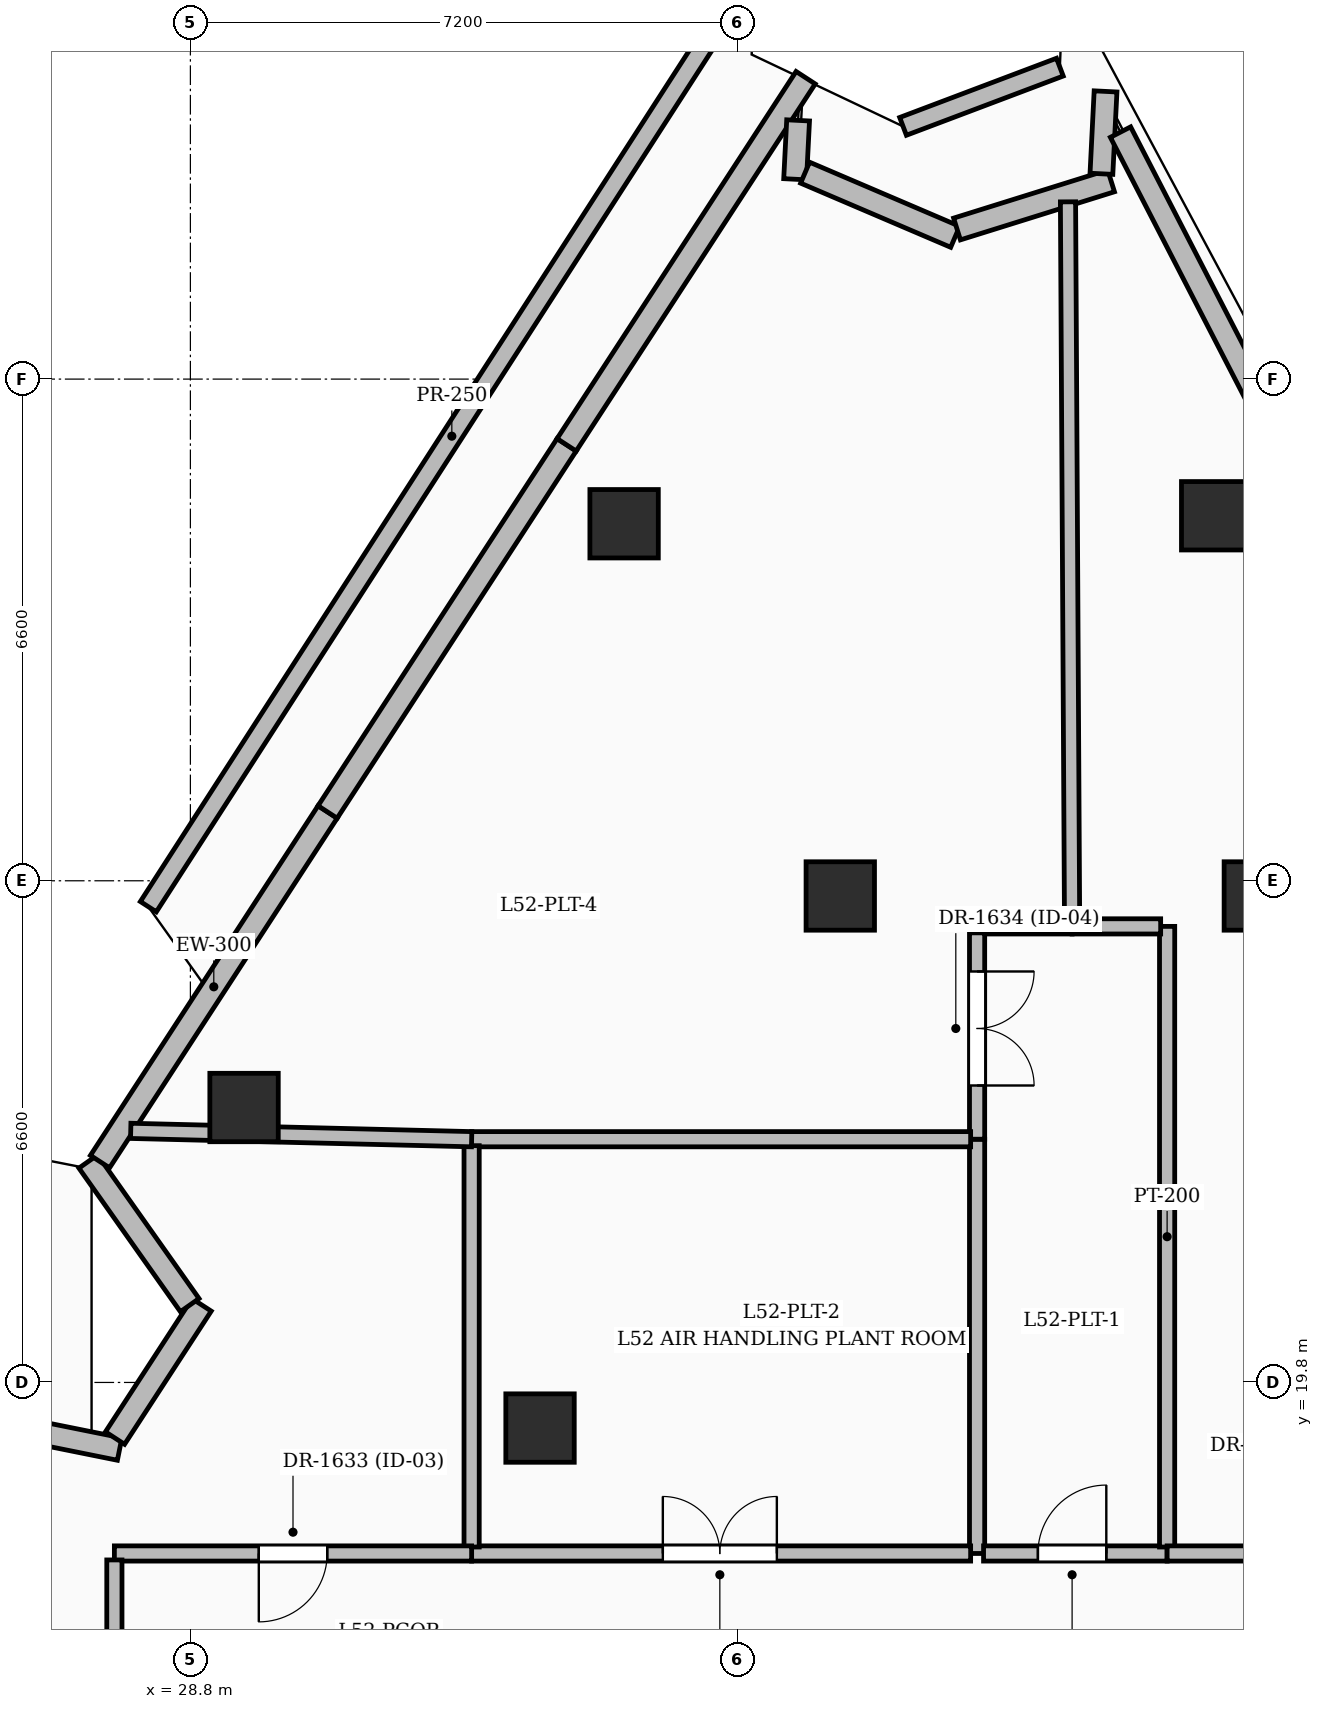
"""IFC4 building model, lengths in metres.
Left out: names, types, materials, properties, quantities, classifications, styles, units other than length and angle.
Written with IfcOpenShell. Run it as: python <this file> out.ifc"""

import sys

from ifc_helpers import new_model, si_unit, direction, frame, frame_2d, origin, origin_2d, place, context, subcontext, project, spatial, rectangle, extrude, element, fill, save


model = new_model("IFC4")
c1 = context("Model", 3, precision=1e-05, world=origin(), true_north=direction((0.0, 1.0)))
c2 = subcontext(c1, "Body", "Model", "MODEL_VIEW")
j1 = project(units=[si_unit("LENGTHUNIT", "METRE"), si_unit("PLANEANGLEUNIT", "RADIAN")], contexts=[c1])
p1 = place(None, origin())
s1 = spatial("IfcSite", under=j1, at=p1, CompositionType="ELEMENT")
p2 = place(p1, origin())
s2 = spatial("IfcBuilding", under=s1, at=p2, CompositionType="ELEMENT")
p3 = place(p2, frame((0.0, 0.0, 201.6)))
s3 = spatial("IfcBuildingStorey", under=s2, at=p3, CompositionType="ELEMENT", Elevation=201.6)
for number, where, z_axis, x_axis in (
    (1, (42.85, 26.2, 0.0), (0.0, 0.0, 1.0), (1.0, 0.0, 0.0)),
    (2, (37.35, 26.2, 0.0), (0.0, 0.0, 1.0), (1.0, 0.0, 0.0)),
    (3, (33.4, 19.2, 0.0), (0.0, 0.0, 1.0), (1.0, 0.0, 0.0)),
    (4, (42.289, 31.202, 0.0), (0.0, 0.0, 1.0), (1.0, 0.0, 0.0)),
    (5, (34.506, 31.097, 0.0), (0.0, 0.0, 1.0), (1.0, 0.0, 0.0)),
    (6, (29.506, 23.417, 0.0), (0.0, 0.0, 1.0), (1.0, 0.0, 0.0)),
):
    element("IfcColumn", number, at=place(p3, frame(where, z_axis=z_axis, x_axis=x_axis)), inside=s3, PredefinedType="COLUMN", context=c2, shape_type="SweptSolid", body=[
        extrude(rectangle(XDim=0.9, YDim=0.9, at=origin_2d()), origin(), (0.0, 0.0, 1.0), 5.4),
    ])
p4 = place(p3, frame((25.326, 19.436, 0.0), z_axis=(0.0, 0.0, 1.0), x_axis=(0.98031922936, -0.197418865732, 0.0)))
e7 = element("IfcWall", 7, at=p4, inside=s3, PredefinedType="SOLIDWALL", context=c2, shape_type="SweptSolid", body=[
    extrude(rectangle(XDim=2.594, YDim=0.3, at=frame_2d((1.297, 0.0))), origin(), (0.0, 0.0, 1.0), 4.475),
])
p5 = place(p3, frame((27.808, 19.068, 0.0), z_axis=(0.0, 0.0, 1.0), x_axis=(0.545448072155, 0.838144617941, 0.0)))
e8 = element("IfcWall", 8, at=p5, inside=s3, PredefinedType="SOLIDWALL", context=c2, shape_type="SweptSolid", body=[
    extrude(rectangle(XDim=2.09, YDim=0.3, at=frame_2d((1.045, 0.0))), origin(), (0.0, 0.0, 1.0), 5.15),
])
p6 = place(p3, frame((28.791, 20.817, 0.0), z_axis=(0.0, 0.0, 1.0), x_axis=(-0.577147231884, 0.816640112123, 0.0)))
e9 = element("IfcWall", 9, at=p6, inside=s3, PredefinedType="SOLIDWALL", context=c2, shape_type="SweptSolid", body=[
    extrude(rectangle(XDim=2.313, YDim=0.3, at=frame_2d((1.156, 0.0))), origin(), (0.0, 0.0, 1.0), 4.475),
])
p7 = place(p3, frame((27.611, 22.705, 0.0), z_axis=(0.0, 0.0, 1.0), x_axis=(0.545593263522, 0.838050112344, 0.0)))
e10 = element("IfcWall", 10, at=p7, inside=s3, PredefinedType="SOLIDWALL", context=c2, shape_type="SweptSolid", body=[
    extrude(rectangle(XDim=5.489, YDim=0.3, at=frame_2d((2.744, 0.0))), origin(), (0.0, 0.0, 1.0), 5.15),
])
p8 = place(p3, frame((30.605, 27.305, 0.0), z_axis=(0.0, 0.0, 1.0), x_axis=(0.545595688913, 0.838048533343, 0.0)))
e11 = element("IfcWall", 11, at=p8, inside=s3, PredefinedType="SOLIDWALL", context=c2, shape_type="SweptSolid", body=[
    extrude(rectangle(XDim=5.763, YDim=0.3, at=frame_2d((2.882, 0.0))), origin(), (0.0, 0.0, 1.0), 5.15),
])
p9 = place(p3, frame((33.75, 32.135, 0.0), z_axis=(0.0, 0.0, 1.0), x_axis=(0.545576320992, 0.838061142145, 0.0)))
e12 = element("IfcWall", 12, at=p9, inside=s3, PredefinedType="SOLIDWALL", context=c2, shape_type="SweptSolid", body=[
    extrude(rectangle(XDim=5.764, YDim=0.3, at=frame_2d((2.882, 0.0))), origin(), (0.0, 0.0, 1.0), 5.15),
])
p10 = place(p3, frame((36.795, 36.404, 0.0), z_axis=(0.0, 0.0, 1.0), x_axis=(-0.051005402626, -0.998698377341, 0.0)))
e13 = element("IfcWall", 13, at=p10, inside=s3, PredefinedType="SOLIDWALL", context=c2, shape_type="SweptSolid", body=[
    extrude(rectangle(XDim=0.775, YDim=0.3, at=frame_2d((0.388, 0.0))), origin(), (0.0, 0.0, 1.0), 5.15),
])
p11 = place(p3, frame((36.887, 35.716, 0.0), z_axis=(0.0, 0.0, 1.0), x_axis=(0.919567916171, -0.392931097711, 0.0)))
e14 = element("IfcWall", 14, at=p11, inside=s3, PredefinedType="SOLIDWALL", context=c2, shape_type="SweptSolid", body=[
    extrude(rectangle(XDim=2.147, YDim=0.3, at=frame_2d((1.074, 0.0))), origin(), (0.0, 0.0, 1.0), 5.15),
])
p12 = place(p3, frame((38.886, 34.975, 0.0), z_axis=(0.0, 0.0, 1.0), x_axis=(0.954524975295, 0.298130963736, 0.0)))
e15 = element("IfcWall", 15, at=p12, inside=s3, PredefinedType="SOLIDWALL", context=c2, shape_type="SweptSolid", body=[
    extrude(rectangle(XDim=2.124, YDim=0.3, at=frame_2d((1.062, 0.0))), origin(), (0.0, 0.0, 1.0), 5.15),
])
p13 = place(p3, frame((40.786, 35.701, 0.0), z_axis=(0.0, 0.0, 1.0), x_axis=(0.05016199642, 0.998741094636, 0.0)))
e16 = element("IfcWall", 16, at=p13, inside=s3, PredefinedType="SOLIDWALL", context=c2, shape_type="SweptSolid", body=[
    extrude(rectangle(XDim=1.085, YDim=0.3, at=frame_2d((0.543, 0.0))), origin(), (0.0, 0.0, 1.0), 5.15),
])
p14 = place(p3, frame((41.037, 36.25, 0.0), z_axis=(0.0, 0.0, 1.0), x_axis=(0.458281808999, -0.888806943909, 0.0)))
e17 = element("IfcWall", 17, at=p14, inside=s3, PredefinedType="SOLIDWALL", context=c2, shape_type="SweptSolid", body=[
    extrude(rectangle(XDim=7.406, YDim=0.3, at=frame_2d((3.703, 0.0))), origin(), (0.0, 0.0, 1.0), 5.15),
])
p15 = place(p3, frame((38.176, 36.325, 0.0), z_axis=(0.0, 0.0, 1.0), x_axis=(0.93551682073, 0.353282150882, 0.0)))
e18 = element("IfcWall", 18, at=p15, inside=s3, PredefinedType="PARAPET", context=c2, shape_type="SweptSolid", body=[
    extrude(rectangle(XDim=2.205, YDim=0.25, at=frame_2d((1.103, 0.0))), origin(), (0.0, 0.0, 1.0), 1.15),
])
p16 = place(p3, frame((28.247, 26.059, 0.0), z_axis=(0.0, 0.0, 1.0), x_axis=(0.542023436135, 0.840363370621, 0.0)))
e19 = element("IfcWall", 19, at=p16, inside=s3, PredefinedType="PARAPET", context=c2, shape_type="SweptSolid", body=[
    extrude(rectangle(XDim=14.732, YDim=0.25, at=frame_2d((7.366, 0.0))), origin(), (0.0, 0.0, 1.0), 1.15),
])
p17 = place(p3, frame((39.15, 23.0, 0.0), z_axis=(0.0, 0.0, 1.0), x_axis=(0.0, -1.0, 0.0)))
e20 = element("IfcWall", 20, at=p17, inside=s3, PredefinedType="PARTITIONING", context=c2, shape_type="SweptSolid", body=[
    extrude(rectangle(XDim=5.45, YDim=0.2, at=frame_2d((2.725, 0.0))), origin(), (0.0, 0.0, 1.0), 5.15),
])
p18 = place(p3, frame((39.235, 17.55, 0.0), z_axis=(0.0, 0.0, 1.0), x_axis=(1.0, 0.0, 0.0)))
e21 = element("IfcWall", 21, at=p18, inside=s3, PredefinedType="PARTITIONING", context=c2, shape_type="SweptSolid", body=[
    extrude(rectangle(XDim=2.415, YDim=0.2, at=frame_2d((1.208, 0.0))), origin(), (0.0, 0.0, 1.0), 5.15),
])
p19 = place(p18, frame((0.715, 0.0, 0.0)))
e22 = element("IfcOpeningElement", 22, at=p19, cuts=e21, PredefinedType="OPENING", context=c2, shape_type="SweptSolid", body=[
    extrude(rectangle(XDim=0.9, YDim=2.1, at=frame_2d((0.45, 1.05))), frame((0.0, 0.11, 0.0), z_axis=(0.0, -1.0, 0.0), x_axis=(1.0, 0.0, 0.0)), (0.0, 0.0, 1.0), 0.22),
])
p20 = place(p3, frame((41.65, 17.635, 0.0), z_axis=(0.0, 0.0, 1.0), x_axis=(0.0, 1.0, 0.0)))
e23 = element("IfcWall", 23, at=p20, inside=s3, PredefinedType="PARTITIONING", context=c2, shape_type="SweptSolid", body=[
    extrude(rectangle(XDim=8.165, YDim=0.2, at=frame_2d((4.083, 0.0))), origin(), (0.0, 0.0, 1.0), 5.15),
])
p21 = place(p3, frame((41.565, 25.8, 0.0), z_axis=(0.0, 0.0, 1.0), x_axis=(-1.0, 0.0, 0.0)))
e24 = element("IfcWall", 24, at=p21, inside=s3, PredefinedType="PARTITIONING", context=c2, shape_type="SweptSolid", body=[
    extrude(rectangle(XDim=1.165, YDim=0.2, at=frame_2d((0.583, 0.0))), origin(), (0.0, 0.0, 1.0), 5.15),
])
p22 = place(p3, frame((40.4, 25.8, 0.0), z_axis=(0.0, 0.0, 1.0), x_axis=(-1.0, 0.0, 0.0)))
e25 = element("IfcWall", 25, at=p22, inside=s3, PredefinedType="PARTITIONING", context=c2, shape_type="SweptSolid", body=[
    extrude(rectangle(XDim=1.25, YDim=0.2, at=frame_2d((0.625, 0.0))), origin(), (0.0, 0.0, 1.0), 5.15),
])
p23 = place(p3, frame((39.15, 25.715, 0.0), z_axis=(0.0, 0.0, 1.0), x_axis=(0.0, -1.0, 0.0)))
e26 = element("IfcWall", 26, at=p23, inside=s3, PredefinedType="PARTITIONING", context=c2, shape_type="SweptSolid", body=[
    extrude(rectangle(XDim=2.715, YDim=0.2, at=frame_2d((1.357, 0.0))), origin(), (0.0, 0.0, 1.0), 5.15),
])
p24 = place(p23, frame((0.508, 0.0, 0.0)))
e27 = element("IfcOpeningElement", 27, at=p24, cuts=e26, PredefinedType="OPENING", context=c2, shape_type="SweptSolid", body=[
    extrude(rectangle(XDim=1.5, YDim=2.2, at=frame_2d((0.75, 1.1))), frame((0.0, 0.11, 0.0), z_axis=(0.0, -1.0, 0.0), x_axis=(1.0, 0.0, 0.0)), (0.0, 0.0, 1.0), 0.22),
])
p25 = place(p3, frame((32.5, 17.55, 0.0), z_axis=(0.0, 0.0, 1.0), x_axis=(1.0, 0.0, 0.0)))
e28 = element("IfcWall", 28, at=p25, inside=s3, PredefinedType="PARTITIONING", context=c2, shape_type="SweptSolid", body=[
    extrude(rectangle(XDim=6.565, YDim=0.2, at=frame_2d((3.282, 0.0))), origin(), (0.0, 0.0, 1.0), 4.335),
])
p26 = place(p25, frame((2.516, 0.0, 0.0)))
e29 = element("IfcOpeningElement", 29, at=p26, cuts=e28, PredefinedType="OPENING", context=c2, shape_type="SweptSolid", body=[
    extrude(rectangle(XDim=1.5, YDim=2.2, at=frame_2d((0.75, 1.1))), frame((0.0, 0.11, 0.0), z_axis=(0.0, -1.0, 0.0), x_axis=(1.0, 0.0, 0.0)), (0.0, 0.0, 1.0), 0.22),
])
p27 = place(p3, frame((39.065, 23.0, 0.0), z_axis=(0.0, 0.0, 1.0), x_axis=(-1.0, 0.0, 0.0)))
e30 = element("IfcWall", 30, at=p27, inside=s3, PredefinedType="PARTITIONING", context=c2, shape_type="SweptSolid", body=[
    extrude(rectangle(XDim=6.565, YDim=0.2, at=frame_2d((3.282, 0.0))), origin(), (0.0, 0.0, 1.0), 4.335),
])
p28 = place(p3, frame((32.5, 22.915, 0.0), z_axis=(0.0, 0.0, 1.0), x_axis=(0.0, -1.0, 0.0)))
e31 = element("IfcWall", 31, at=p28, inside=s3, PredefinedType="PARTITIONING", context=c2, shape_type="SweptSolid", body=[
    extrude(rectangle(XDim=5.28, YDim=0.2, at=frame_2d((2.64, 0.0))), origin(), (0.0, 0.0, 1.0), 4.264),
])
p29 = place(p3, frame((46.8, 17.55, 0.0), z_axis=(0.0, 0.0, 1.0), x_axis=(-1.0, 0.0, 0.0)))
e32 = element("IfcWall", 32, at=p29, inside=s3, PredefinedType="PARTITIONING", context=c2, shape_type="SweptSolid", body=[
    extrude(rectangle(XDim=5.15, YDim=0.2, at=frame_2d((2.575, 0.0))), origin(), (0.0, 0.0, 1.0), 4.335),
])
p30 = place(p29, frame((2.115, 0.0, 0.0)))
e33 = element("IfcOpeningElement", 33, at=p30, cuts=e32, PredefinedType="OPENING", context=c2, shape_type="SweptSolid", body=[
    extrude(rectangle(XDim=1.5, YDim=2.2, at=frame_2d((0.75, 1.1))), frame((0.0, 0.11, 0.0), z_axis=(0.0, -1.0, 0.0), x_axis=(1.0, 0.0, 0.0)), (0.0, 0.0, 1.0), 0.22),
])
p31 = place(p3, frame((32.5, 17.55, 0.0), z_axis=(0.0, 0.0, 1.0), x_axis=(-1.0, 0.0, 0.0)))
e34 = element("IfcWall", 34, at=p31, inside=s3, PredefinedType="PARTITIONING", context=c2, shape_type="SweptSolid", body=[
    extrude(rectangle(XDim=4.7, YDim=0.2, at=frame_2d((2.35, 0.0))), origin(), (0.0, 0.0, 1.0), 5.15),
])
p32 = place(p31, frame((1.9, 0.0, 0.0)))
e35 = element("IfcOpeningElement", 35, at=p32, cuts=e34, PredefinedType="OPENING", context=c2, shape_type="SweptSolid", body=[
    extrude(rectangle(XDim=0.9, YDim=2.1, at=frame_2d((0.45, 1.05))), frame((0.0, 0.11, 0.0), z_axis=(0.0, -1.0, 0.0), x_axis=(1.0, 0.0, 0.0)), (0.0, 0.0, 1.0), 0.22),
])
p33 = place(p3, frame((27.8, 17.465, 0.0), z_axis=(0.0, 0.0, 1.0), x_axis=(0.0, -1.0, 0.0)))
e36 = element("IfcWall", 36, at=p33, inside=s3, PredefinedType="PARTITIONING", context=c2, shape_type="SweptSolid", body=[
    extrude(rectangle(XDim=2.34, YDim=0.2, at=frame_2d((1.17, 0.0))), origin(), (0.0, 0.0, 1.0), 5.15),
])
p34 = place(p3, frame((40.346, 35.332, 0.0), z_axis=(0.0, 0.0, 1.0), x_axis=(0.005685397192, -0.999983837999, 0.0)))
e37 = element("IfcWall", 37, at=p34, inside=s3, PredefinedType="PARTITIONING", context=c2, shape_type="SweptSolid", body=[
    extrude(rectangle(XDim=9.447, YDim=0.2, at=frame_2d((4.724, 0.0))), origin(), (0.0, 0.0, 1.0), 4.335),
])
p35 = place(p3, frame((28.015, 23.11, 0.0), z_axis=(0.0, 0.0, 1.0), x_axis=(0.999698795648, -0.024542167375, 0.0)))
e38 = element("IfcWall", 38, at=p35, inside=s3, PredefinedType="PARTITIONING", context=c2, shape_type="SweptSolid", body=[
    extrude(rectangle(XDim=4.487, YDim=0.2, at=frame_2d((2.243, 0.0))), origin(), (0.0, 0.0, 1.0), 4.264),
])
p36 = place(p19, origin())
e39 = element("IfcDoor", 39, at=p36, inside=s3, OperationType="SINGLE_SWING_RIGHT", PredefinedType="DOOR", context=c2, shape_type="SweptSolid", body=[
    extrude(rectangle(XDim=0.9, YDim=2.1, at=frame_2d((0.45, 1.05))), frame((0.0, 0.025, 0.0), z_axis=(0.0, -1.0, 0.0), x_axis=(1.0, 0.0, 0.0)), (0.0, 0.0, 1.0), 0.05),
])
fill(e22, e39)
p37 = place(p26, origin())
e40 = element("IfcDoor", 40, at=p37, inside=s3, OperationType="DOUBLE_DOOR_SINGLE_SWING", PredefinedType="DOOR", context=c2, shape_type="SweptSolid", body=[
    extrude(rectangle(XDim=1.5, YDim=2.2, at=frame_2d((0.75, 1.1))), frame((0.0, 0.025, 0.0), z_axis=(0.0, -1.0, 0.0), x_axis=(1.0, 0.0, 0.0)), (0.0, 0.0, 1.0), 0.05),
])
fill(e29, e40)
p38 = place(p32, origin())
e41 = element("IfcDoor", 41, at=p38, inside=s3, OperationType="SINGLE_SWING_RIGHT", PredefinedType="DOOR", context=c2, shape_type="SweptSolid", body=[
    extrude(rectangle(XDim=0.9, YDim=2.1, at=frame_2d((0.45, 1.05))), frame((0.0, 0.025, 0.0), z_axis=(0.0, -1.0, 0.0), x_axis=(1.0, 0.0, 0.0)), (0.0, 0.0, 1.0), 0.05),
])
fill(e35, e41)
p39 = place(p24, origin())
e42 = element("IfcDoor", 42, at=p39, inside=s3, OperationType="DOUBLE_DOOR_SINGLE_SWING", PredefinedType="DOOR", context=c2, shape_type="SweptSolid", body=[
    extrude(rectangle(XDim=1.5, YDim=2.2, at=frame_2d((0.75, 1.1))), frame((0.0, 0.025, 0.0), z_axis=(0.0, -1.0, 0.0), x_axis=(1.0, 0.0, 0.0)), (0.0, 0.0, 1.0), 0.05),
])
fill(e27, e42)
save(model, sys.argv[1])
